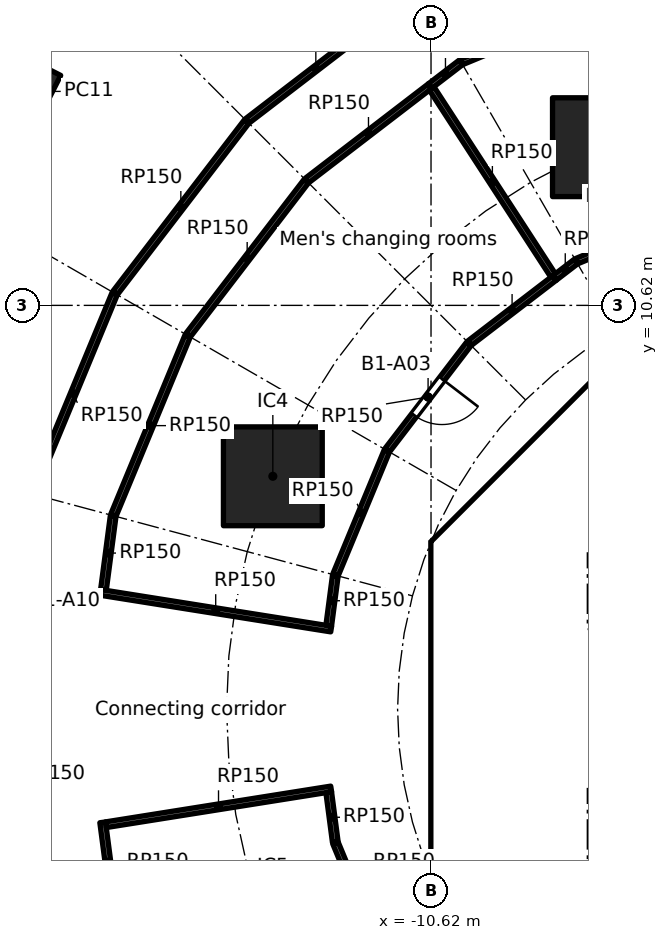
"""IFC4 building model, lengths in metres.
Left out: names, types, materials, properties, quantities, classifications, styles, units other than length and angle.
Written with IfcOpenShell. Run it as: python <this file> out.ifc"""

import sys

from ifc_helpers import new_model, si_unit, direction, frame, frame_2d, origin, origin_2d, place, context, subcontext, project, spatial, polyline, rectangle, hollow_rectangle, outline, extrude, element, fill, save


model = new_model("IFC4")
c1 = context("Model", 3, precision=1e-05, world=origin(), true_north=direction((0.0, 1.0)))
c2 = subcontext(c1, "Body", "Model", "MODEL_VIEW")
j1 = project(units=[si_unit("LENGTHUNIT", "METRE"), si_unit("PLANEANGLEUNIT", "RADIAN")], contexts=[c1])
p1 = place(None, origin())
s1 = spatial("IfcSite", under=j1, at=p1, CompositionType="ELEMENT")
p2 = place(p1, origin())
s2 = spatial("IfcBuilding", under=s1, at=p2, CompositionType="ELEMENT")
p3 = place(p2, frame((0.0, 0.0, -5.0)))
s3 = spatial("IfcBuildingStorey", under=s2, at=p3, CompositionType="ELEMENT", Elevation=-5.0)
p4 = place(p3, frame((-21.082, 16.25, 0.0), z_axis=(0.0, 0.0, 1.0), x_axis=(-0.452462697578, -0.891783329795, 0.0)))
e1 = element("IfcColumn", 1, at=p4, inside=s3, PredefinedType="COLUMN", context=c2, shape_type="SweptSolid", body=[
    extrude(hollow_rectangle(XDim=1.4, YDim=0.9, WallThickness=0.05, at=origin_2d()), origin(), (0.0, 0.0, 1.0), 5.0),
])
for number, where, z_axis, x_axis in (
    (2, (-6.123, 14.782, 0.0), (0.0, 0.0, 1.0), (1.0, 0.0, 0.0)),
    (3, (-14.782, 6.123, 0.0), (0.0, 0.0, 1.0), (1.0, 0.0, 0.0)),
):
    element("IfcColumn", number, at=place(p3, frame(where, z_axis=z_axis, x_axis=x_axis)), inside=s3, PredefinedType="COLUMN", context=c2, shape_type="SweptSolid", body=[
        extrude(rectangle(XDim=2.6, YDim=2.6, at=origin_2d()), origin(), (0.0, 0.0, 1.0), 5.0),
    ])
p5 = place(p3, frame((-4.613, 9.988, 0.0), z_axis=(0.0, 0.0, 1.0), x_axis=(-0.707106781187, -0.707106781187, 0.0)))
e4 = element("IfcWall", 4, at=p5, inside=s3, PredefinedType="SHEAR", context=c2, shape_type="SweptSolid", body=[
    extrude(rectangle(XDim=7.602, YDim=0.6, at=frame_2d((3.801, 0.0))), origin(), (0.0, 0.0, 1.0), 4.6),
])
p6 = place(p5, frame((0.351, 0.0, 0.0)))
e5 = element("IfcOpeningElement", 5, at=p6, cuts=e4, PredefinedType="OPENING", context=c2, shape_type="SweptSolid", body=[
    extrude(rectangle(XDim=1.1, YDim=2.1, at=frame_2d((0.55, 1.05))), frame((0.0, 0.31, 0.0), z_axis=(0.0, -1.0, 0.0), x_axis=(1.0, 0.0, 0.0)), (0.0, 0.0, 1.0), 0.62),
])
p7 = place(p3, frame((-10.325, 3.801, 0.0), z_axis=(0.0, 0.0, 1.0), x_axis=(0.0, -1.0, 0.0)))
e6 = element("IfcWall", 6, at=p7, inside=s3, PredefinedType="SHEAR", context=c2, shape_type="SweptSolid", body=[
    extrude(rectangle(XDim=7.602, YDim=0.6, at=frame_2d((3.801, 0.0))), origin(), (0.0, 0.0, 1.0), 4.6),
])
p8 = place(p7, frame((0.651, 0.0, 0.0)))
e7 = element("IfcOpeningElement", 7, at=p8, cuts=e6, PredefinedType="OPENING", context=c2, shape_type="SweptSolid", body=[
    extrude(rectangle(XDim=1.5, YDim=2.1, at=frame_2d((0.75, 1.05))), frame((0.0, 0.31, 0.0), z_axis=(0.0, -1.0, 0.0), x_axis=(1.0, 0.0, 0.0)), (0.0, 0.0, 1.0), 0.62),
])
p9 = place(p7, frame((5.451, 0.0, 0.0)))
e8 = element("IfcOpeningElement", 8, at=p9, cuts=e6, PredefinedType="OPENING", context=c2, shape_type="SweptSolid", body=[
    extrude(rectangle(XDim=1.5, YDim=2.1, at=frame_2d((0.75, 1.05))), frame((0.0, 0.31, 0.0), z_axis=(0.0, -1.0, 0.0), x_axis=(1.0, 0.0, 0.0)), (0.0, 0.0, 1.0), 0.62),
])
p10 = place(p3, frame((-6.7, 2.0, 0.0), z_axis=(0.0, 0.0, 1.0), x_axis=(1.0, 0.0, 0.0)))
e9 = element("IfcWall", 9, at=p10, inside=s3, PredefinedType="SOLIDWALL", context=c2, shape_type="SweptSolid", body=[
    extrude(rectangle(XDim=13.4, YDim=0.2, at=frame_2d((6.7, 0.0))), origin(), (0.0, 0.0, 1.0), 4.6),
])
p11 = place(p10, frame((0.65, 0.0, 0.0)))
e10 = element("IfcOpeningElement", 10, at=p11, cuts=e9, PredefinedType="OPENING", context=c2, shape_type="SweptSolid", body=[
    extrude(rectangle(XDim=1.1, YDim=2.1, at=frame_2d((0.55, 1.05))), frame((0.0, 0.11, 0.0), z_axis=(0.0, -1.0, 0.0), x_axis=(1.0, 0.0, 0.0)), (0.0, 0.0, 1.0), 0.22),
])
p12 = place(p10, frame((2.85, 0.0, 0.0)))
e11 = element("IfcOpeningElement", 11, at=p12, cuts=e9, PredefinedType="OPENING", context=c2, shape_type="SweptSolid", body=[
    extrude(rectangle(XDim=1.1, YDim=2.1, at=frame_2d((0.55, 1.05))), frame((0.0, 0.11, 0.0), z_axis=(0.0, -1.0, 0.0), x_axis=(1.0, 0.0, 0.0)), (0.0, 0.0, 1.0), 0.22),
])
p13 = place(p10, frame((5.05, 0.0, 0.0)))
e12 = element("IfcOpeningElement", 12, at=p13, cuts=e9, PredefinedType="OPENING", context=c2, shape_type="SweptSolid", body=[
    extrude(rectangle(XDim=1.1, YDim=2.1, at=frame_2d((0.55, 1.05))), frame((0.0, 0.11, 0.0), z_axis=(0.0, -1.0, 0.0), x_axis=(1.0, 0.0, 0.0)), (0.0, 0.0, 1.0), 0.22),
])
p14 = place(p10, frame((7.25, 0.0, 0.0)))
e13 = element("IfcOpeningElement", 13, at=p14, cuts=e9, PredefinedType="OPENING", context=c2, shape_type="SweptSolid", body=[
    extrude(rectangle(XDim=1.1, YDim=2.1, at=frame_2d((0.55, 1.05))), frame((0.0, 0.11, 0.0), z_axis=(0.0, -1.0, 0.0), x_axis=(1.0, 0.0, 0.0)), (0.0, 0.0, 1.0), 0.22),
])
p15 = place(p10, frame((9.45, 0.0, 0.0)))
e14 = element("IfcOpeningElement", 14, at=p15, cuts=e9, PredefinedType="OPENING", context=c2, shape_type="SweptSolid", body=[
    extrude(rectangle(XDim=1.1, YDim=2.1, at=frame_2d((0.55, 1.05))), frame((0.0, 0.11, 0.0), z_axis=(0.0, -1.0, 0.0), x_axis=(1.0, 0.0, 0.0)), (0.0, 0.0, 1.0), 0.22),
])
p16 = place(p10, frame((11.65, 0.0, 0.0)))
e15 = element("IfcOpeningElement", 15, at=p16, cuts=e9, PredefinedType="OPENING", context=c2, shape_type="SweptSolid", body=[
    extrude(rectangle(XDim=1.1, YDim=2.1, at=frame_2d((0.55, 1.05))), frame((0.0, 0.11, 0.0), z_axis=(0.0, -1.0, 0.0), x_axis=(1.0, 0.0, 0.0)), (0.0, 0.0, 1.0), 0.22),
])
p17 = place(p3, frame((-6.7, -2.0, 0.0), z_axis=(0.0, 0.0, 1.0), x_axis=(1.0, 0.0, 0.0)))
e16 = element("IfcWall", 16, at=p17, inside=s3, PredefinedType="SOLIDWALL", context=c2, shape_type="SweptSolid", body=[
    extrude(rectangle(XDim=13.4, YDim=0.2, at=frame_2d((6.7, 0.0))), origin(), (0.0, 0.0, 1.0), 4.6),
])
p18 = place(p17, frame((0.65, 0.0, 0.0)))
e17 = element("IfcOpeningElement", 17, at=p18, cuts=e16, PredefinedType="OPENING", context=c2, shape_type="SweptSolid", body=[
    extrude(rectangle(XDim=1.1, YDim=2.1, at=frame_2d((0.55, 1.05))), frame((0.0, 0.11, 0.0), z_axis=(0.0, -1.0, 0.0), x_axis=(1.0, 0.0, 0.0)), (0.0, 0.0, 1.0), 0.22),
])
p19 = place(p17, frame((2.85, 0.0, 0.0)))
e18 = element("IfcOpeningElement", 18, at=p19, cuts=e16, PredefinedType="OPENING", context=c2, shape_type="SweptSolid", body=[
    extrude(rectangle(XDim=1.1, YDim=2.1, at=frame_2d((0.55, 1.05))), frame((0.0, 0.11, 0.0), z_axis=(0.0, -1.0, 0.0), x_axis=(1.0, 0.0, 0.0)), (0.0, 0.0, 1.0), 0.22),
])
p20 = place(p17, frame((5.05, 0.0, 0.0)))
e19 = element("IfcOpeningElement", 19, at=p20, cuts=e16, PredefinedType="OPENING", context=c2, shape_type="SweptSolid", body=[
    extrude(rectangle(XDim=1.1, YDim=2.1, at=frame_2d((0.55, 1.05))), frame((0.0, 0.11, 0.0), z_axis=(0.0, -1.0, 0.0), x_axis=(1.0, 0.0, 0.0)), (0.0, 0.0, 1.0), 0.22),
])
p21 = place(p17, frame((7.25, 0.0, 0.0)))
e20 = element("IfcOpeningElement", 20, at=p21, cuts=e16, PredefinedType="OPENING", context=c2, shape_type="SweptSolid", body=[
    extrude(rectangle(XDim=1.1, YDim=2.1, at=frame_2d((0.55, 1.05))), frame((0.0, 0.11, 0.0), z_axis=(0.0, -1.0, 0.0), x_axis=(1.0, 0.0, 0.0)), (0.0, 0.0, 1.0), 0.22),
])
p22 = place(p17, frame((9.45, 0.0, 0.0)))
e21 = element("IfcOpeningElement", 21, at=p22, cuts=e16, PredefinedType="OPENING", context=c2, shape_type="SweptSolid", body=[
    extrude(rectangle(XDim=1.1, YDim=2.1, at=frame_2d((0.55, 1.05))), frame((0.0, 0.11, 0.0), z_axis=(0.0, -1.0, 0.0), x_axis=(1.0, 0.0, 0.0)), (0.0, 0.0, 1.0), 0.22),
])
p23 = place(p17, frame((11.65, 0.0, 0.0)))
e22 = element("IfcOpeningElement", 22, at=p23, cuts=e16, PredefinedType="OPENING", context=c2, shape_type="SweptSolid", body=[
    extrude(rectangle(XDim=1.1, YDim=2.1, at=frame_2d((0.55, 1.05))), frame((0.0, 0.11, 0.0), z_axis=(0.0, -1.0, 0.0), x_axis=(1.0, 0.0, 0.0)), (0.0, 0.0, 1.0), 0.22),
])
p24 = place(p3, origin())
e23 = element("IfcWall", 23, at=p24, inside=s3, PredefinedType="SHEAR", context=c2, shape_type="SweptSolid", body=[
    extrude(outline(polyline([(-10.625, -3.801), (-10.025, -3.801), (-10.025, -4.152), (-9.776, -4.401), (-10.2, -4.825), (-10.625, -4.401), (-10.625, -3.801)])), origin(), (0.0, 0.0, 1.0), 4.6),
])
p25 = place(p3, origin())
e24 = element("IfcWall", 24, at=p25, inside=s3, PredefinedType="SHEAR", context=c2, shape_type="SweptSolid", body=[
    extrude(outline(polyline([(-10.2, 4.825), (-9.776, 4.401), (-10.025, 4.152), (-10.025, 3.801), (-10.625, 3.801), (-10.625, 4.401), (-10.2, 4.825)])), origin(), (0.0, 0.0, 1.0), 4.6),
])
p26 = place(p3, origin())
e25 = element("IfcWall", 25, at=p26, inside=s3, PredefinedType="SOLIDWALL", context=c2, shape_type="SweptSolid", body=[
    extrude(outline(polyline([(-6.7, -2.1), (-6.5, -2.1), (-6.5, -4.1), (-4.5, -4.1), (-4.5, -2.1), (-4.3, -2.1), (-4.3, -4.1), (-2.3, -4.1), (-2.3, -2.1), (-2.1, -2.1), (-2.1, -4.1), (-0.1, -4.1), (-0.1, -2.1), (0.1, -2.1), (0.1, -4.1), (2.1, -4.1), (2.1, -2.1), (2.3, -2.1), (2.3, -4.1), (4.3, -4.1), (4.3, -2.1), (4.5, -2.1), (4.5, -4.1), (6.5, -4.1), (6.5, -2.1), (6.7, -2.1), (6.7, -4.3), (-6.7, -4.3), (-6.7, -2.1)])), origin(), (0.0, 0.0, 1.0), 4.6),
])
p27 = place(p3, origin())
e26 = element("IfcWall", 26, at=p27, inside=s3, PredefinedType="SOLIDWALL", context=c2, shape_type="SweptSolid", body=[
    extrude(outline(polyline([(-6.5, 2.1), (-6.7, 2.1), (-6.7, 4.3), (6.7, 4.3), (6.7, 2.1), (6.5, 2.1), (6.5, 4.1), (4.5, 4.1), (4.5, 2.1), (4.3, 2.1), (4.3, 4.1), (2.3, 4.1), (2.3, 2.1), (2.1, 2.1), (2.1, 4.1), (0.1, 4.1), (0.1, 2.1), (-0.1, 2.1), (-0.1, 4.1), (-2.1, 4.1), (-2.1, 2.1), (-2.3, 2.1), (-2.3, 4.1), (-4.3, 4.1), (-4.3, 2.1), (-4.5, 2.1), (-4.5, 4.1), (-6.5, 4.1), (-6.5, 2.1)])), origin(), (0.0, 0.0, 1.0), 4.6),
])
for number, where, z_axis, x_axis in (
    (27, (-10.025, -4.0, 0.0), (0.0, 0.0, 1.0), (1.0, 0.0, 0.0)),
    (28, (-10.025, 4.0, 0.0), (0.0, 0.0, 1.0), (1.0, 0.0, 0.0)),
):
    element("IfcWall", number, at=place(p3, frame(where, z_axis=z_axis, x_axis=x_axis)), inside=s3, PredefinedType="PARTITIONING", context=c2, shape_type="SweptSolid", body=[
        extrude(rectangle(XDim=3.325, YDim=0.2, at=frame_2d((1.662, 0.0))), origin(), (0.0, 0.0, 1.0), 4.6),
    ])
p28 = place(p3, frame((-21.121, 5.672, 0.0), z_axis=(0.0, 0.0, 1.0), x_axis=(0.38269058712, 0.923876568882, 0.0)))
e29 = element("IfcWall", 29, at=p28, inside=s3, PredefinedType="PARTITIONING", context=c2, shape_type="SweptSolid", body=[
    extrude(rectangle(XDim=5.686, YDim=0.15, at=frame_2d((2.843, 0.0))), origin(), (0.0, 0.0, 1.0), 4.6),
])
p29 = place(p3, frame((-19.259, -2.982, 0.0), z_axis=(0.0, 0.0, 1.0), x_axis=(0.130625106848, -0.991431833996, 0.0)))
e30 = element("IfcWall", 30, at=p29, inside=s3, PredefinedType="PARTITIONING", context=c2, shape_type="SweptSolid", body=[
    extrude(rectangle(XDim=2.11, YDim=0.15, at=frame_2d((1.055, 0.0))), origin(), (0.0, 0.0, 1.0), 4.6),
])
p30 = place(p3, frame((-19.323, 3.069, 0.0), z_axis=(0.0, 0.0, 1.0), x_axis=(0.987626164326, -0.156826526897, 0.0)))
e31 = element("IfcWall", 31, at=p30, inside=s3, PredefinedType="PARTITIONING", context=c2, shape_type="SweptSolid", body=[
    extrude(rectangle(XDim=6.152, YDim=0.15, at=frame_2d((3.076, 0.0))), origin(), (0.0, 0.0, 1.0), 4.6),
])
p31 = place(p3, frame((-18.984, 5.074, 0.0), z_axis=(0.0, 0.0, 1.0), x_axis=(-0.130547959689, -0.991441995389, 0.0)))
e32 = element("IfcWall", 32, at=p31, inside=s3, PredefinedType="PARTITIONING", context=c2, shape_type="SweptSolid", body=[
    extrude(rectangle(XDim=1.96, YDim=0.15, at=frame_2d((0.98, 0.0))), origin(), (0.0, 0.0, 1.0), 4.6),
])
p32 = place(p3, frame((-18.933, 10.945, 0.0), z_axis=(0.0, 0.0, 1.0), x_axis=(0.608757822828, 0.793356107398, 0.0)))
e33 = element("IfcWall", 33, at=p32, inside=s3, PredefinedType="PARTITIONING", context=c2, shape_type="SweptSolid", body=[
    extrude(rectangle(XDim=5.686, YDim=0.15, at=frame_2d((2.843, 0.0))), origin(), (0.0, 0.0, 1.0), 4.6),
])
p33 = place(p3, frame((-17.023, 9.815, 0.0), z_axis=(0.0, 0.0, 1.0), x_axis=(-0.382672704618, -0.923883976017, 0.0)))
e34 = element("IfcWall", 34, at=p33, inside=s3, PredefinedType="PARTITIONING", context=c2, shape_type="SweptSolid", body=[
    extrude(rectangle(XDim=5.106, YDim=0.15, at=frame_2d((2.553, 0.0))), origin(), (0.0, 0.0, 1.0), 4.6),
])
p34 = place(p3, frame((-15.456, 15.472, 0.0), z_axis=(0.0, 0.0, 1.0), x_axis=(0.793357543816, 0.608755950829, 0.0)))
e35 = element("IfcWall", 35, at=p34, inside=s3, PredefinedType="PARTITIONING", context=c2, shape_type="SweptSolid", body=[
    extrude(rectangle(XDim=4.55, YDim=0.15, at=frame_2d((2.275, 0.0))), origin(), (0.0, 0.0, 1.0), 4.6),
])
p35 = place(p3, frame((-13.903, 13.886, 0.0), z_axis=(0.0, 0.0, 1.0), x_axis=(-0.608760705644, -0.793353895348, 0.0)))
e36 = element("IfcWall", 36, at=p35, inside=s3, PredefinedType="PARTITIONING", context=c2, shape_type="SweptSolid", body=[
    extrude(rectangle(XDim=5.106, YDim=0.15, at=frame_2d((2.553, 0.0))), origin(), (0.0, 0.0, 1.0), 4.6),
])
p36 = place(p3, frame((-13.247, -2.104, 0.0), z_axis=(0.0, 0.0, 1.0), x_axis=(-0.98762373009, -0.156841855905, 0.0)))
e37 = element("IfcWall", 37, at=p36, inside=s3, PredefinedType="PARTITIONING", context=c2, shape_type="SweptSolid", body=[
    extrude(rectangle(XDim=6.002, YDim=0.15, at=frame_2d((3.001, 0.0))), origin(), (0.0, 0.0, 1.0), 4.6),
])
for number, where, z_axis, x_axis in (
    (38, (-13.312, 2.19, 0.0), (0.0, 0.0, 1.0), (0.131, 0.991, 0.0)),
    (39, (-13.138, -3.508, 0.0), (0.0, 0.0, 1.0), (-0.131, 0.991, 0.0)),
):
    element("IfcWall", number, at=place(p3, frame(where, z_axis=z_axis, x_axis=x_axis)), inside=s3, PredefinedType="PARTITIONING", context=c2, shape_type="SweptSolid", body=[
        extrude(rectangle(XDim=1.33, YDim=0.15, at=frame_2d((0.665, 0.0))), origin(), (0.0, 0.0, 1.0), 4.6),
    ])
p37 = place(p3, frame((-13.132, 3.531, 0.0), z_axis=(0.0, 0.0, 1.0), x_axis=(0.382677866108, 0.923881838111, 0.0)))
e40 = element("IfcWall", 40, at=p37, inside=s3, PredefinedType="PARTITIONING", context=c2, shape_type="SweptSolid", body=[
    extrude(rectangle(XDim=3.527, YDim=0.15, at=frame_2d((1.763, 0.0))), origin(), (0.0, 0.0, 1.0), 4.6),
])
p38 = place(p3, frame((-11.782, -6.789, 0.0), z_axis=(0.0, 0.0, 1.0), x_axis=(-0.382677866108, 0.923881838111, 0.0)))
e41 = element("IfcWall", 41, at=p38, inside=s3, PredefinedType="PARTITIONING", context=c2, shape_type="SweptSolid", body=[
    extrude(rectangle(XDim=3.527, YDim=0.15, at=frame_2d((1.763, 0.0))), origin(), (0.0, 0.0, 1.0), 4.6),
])
p39 = place(p38, frame((0.346, 0.0, 0.0)))
e42 = element("IfcOpeningElement", 42, at=p39, cuts=e41, PredefinedType="OPENING", context=c2, shape_type="SweptSolid", body=[
    extrude(rectangle(XDim=0.9, YDim=2.1, at=frame_2d((0.45, 1.05))), frame((0.0, 0.085, 0.0), z_axis=(0.0, -1.0, 0.0), x_axis=(1.0, 0.0, 0.0)), (0.0, 0.0, 1.0), 0.17),
])
p40 = place(p3, frame((-11.771, 6.809, 0.0), z_axis=(0.0, 0.0, 1.0), x_axis=(0.608736710054, 0.793372307201, 0.0)))
e43 = element("IfcWall", 43, at=p40, inside=s3, PredefinedType="PARTITIONING", context=c2, shape_type="SweptSolid", body=[
    extrude(rectangle(XDim=3.527, YDim=0.15, at=frame_2d((1.763, 0.0))), origin(), (0.0, 0.0, 1.0), 4.6),
])
p41 = place(p40, frame((1.163, 0.0, 0.0)))
e44 = element("IfcOpeningElement", 44, at=p41, cuts=e43, PredefinedType="OPENING", context=c2, shape_type="SweptSolid", body=[
    extrude(rectangle(XDim=1.2, YDim=2.1, at=frame_2d((0.6, 1.05))), frame((0.0, 0.085, 0.0), z_axis=(0.0, -1.0, 0.0), x_axis=(1.0, 0.0, 0.0)), (0.0, 0.0, 1.0), 0.17),
])
p42 = place(p3, frame((-10.644, 16.391, 0.0), z_axis=(0.0, 0.0, 1.0), x_axis=(-0.793356294792, -0.608757578609, 0.0)))
e45 = element("IfcWall", 45, at=p42, inside=s3, PredefinedType="PARTITIONING", context=c2, shape_type="SweptSolid", body=[
    extrude(rectangle(XDim=4.087, YDim=0.15, at=frame_2d((2.043, 0.0))), origin(), (0.0, 0.0, 1.0), 4.6),
])
p43 = place(p3, frame((-9.835, 17.012, 0.0), z_axis=(0.0, 0.0, 1.0), x_axis=(-0.793344280216, -0.608773236147, 0.0)))
e46 = element("IfcWall", 46, at=p43, inside=s3, PredefinedType="PARTITIONING", context=c2, shape_type="SweptSolid", body=[
    extrude(rectangle(XDim=1.02, YDim=0.15, at=frame_2d((0.51, 0.0))), origin(), (0.0, 0.0, 1.0), 4.6),
])
p44 = place(p3, frame((-9.607, 9.624, 0.0), z_axis=(0.0, 0.0, 1.0), x_axis=(0.793375345407, 0.608732750311, 0.0)))
e47 = element("IfcWall", 47, at=p44, inside=s3, PredefinedType="PARTITIONING", context=c2, shape_type="SweptSolid", body=[
    extrude(rectangle(XDim=2.824, YDim=0.15, at=frame_2d((1.412, 0.0))), origin(), (0.0, 0.0, 1.0), 4.6),
])
p45 = place(p3, frame((-7.407, 11.406, 0.0), z_axis=(0.0, 0.0, 1.0), x_axis=(-0.544646109016, 0.838665973993, 0.0)))
e48 = element("IfcWall", 48, at=p45, inside=s3, PredefinedType="PARTITIONING", context=c2, shape_type="SweptSolid", body=[
    extrude(rectangle(XDim=5.868, YDim=0.15, at=frame_2d((2.934, 0.0))), origin(), (0.0, 0.0, 1.0), 4.6),
])
p46 = place(p3, frame((-7.366, 11.343, 0.0), z_axis=(0.0, 0.0, 1.0), x_axis=(0.793360087844, 0.608752635326, 0.0)))
e49 = element("IfcWall", 49, at=p46, inside=s3, PredefinedType="PARTITIONING", context=c2, shape_type="SweptSolid", body=[
    extrude(rectangle(XDim=0.702, YDim=0.15, at=frame_2d((0.351, 0.0))), origin(), (0.0, 0.0, 1.0), 4.6),
])
p47 = place(p3, frame((-6.789, 11.782, 0.0), z_axis=(0.0, 0.0, 1.0), x_axis=(0.923881838111, 0.382677866108, 0.0)))
e50 = element("IfcWall", 50, at=p47, inside=s3, PredefinedType="PARTITIONING", context=c2, shape_type="SweptSolid", body=[
    extrude(rectangle(XDim=3.527, YDim=0.15, at=frame_2d((1.763, 0.0))), origin(), (0.0, 0.0, 1.0), 4.6),
])
p48 = place(p3, frame((-5.097, 18.978, 0.0), z_axis=(0.0, 0.0, 1.0), x_axis=(-0.923883976017, -0.382672704618, 0.0)))
e51 = element("IfcWall", 51, at=p48, inside=s3, PredefinedType="PARTITIONING", context=c2, shape_type="SweptSolid", body=[
    extrude(rectangle(XDim=5.106, YDim=0.15, at=frame_2d((2.553, 0.0))), origin(), (0.0, 0.0, 1.0), 4.6),
])
p49 = place(p8, origin())
e52 = element("IfcDoor", 52, at=p49, inside=s3, OperationType="DOUBLE_DOOR_SINGLE_SWING", PredefinedType="DOOR", context=c2, shape_type="SweptSolid", body=[
    extrude(rectangle(XDim=1.5, YDim=2.1, at=frame_2d((0.75, 1.05))), frame((0.0, 0.025, 0.0), z_axis=(0.0, -1.0, 0.0), x_axis=(1.0, 0.0, 0.0)), (0.0, 0.0, 1.0), 0.05),
])
fill(e7, e52)
p50 = place(p9, origin())
e53 = element("IfcDoor", 53, at=p50, inside=s3, OperationType="DOUBLE_DOOR_SINGLE_SWING", PredefinedType="DOOR", context=c2, shape_type="SweptSolid", body=[
    extrude(rectangle(XDim=1.5, YDim=2.1, at=frame_2d((0.75, 1.05))), frame((0.0, 0.025, 0.0), z_axis=(0.0, -1.0, 0.0), x_axis=(1.0, 0.0, 0.0)), (0.0, 0.0, 1.0), 0.05),
])
fill(e8, e53)
p51 = place(p41, frame((1.2, 0.0, 0.0), x_axis=(-1.0, 0.0, 0.0)))
e54 = element("IfcDoor", 54, at=p51, inside=s3, OperationType="SINGLE_SWING_LEFT", PredefinedType="DOOR", context=c2, shape_type="SweptSolid", body=[
    extrude(rectangle(XDim=1.2, YDim=2.1, at=frame_2d((0.6, 1.05))), frame((0.0, 0.025, 0.0), z_axis=(0.0, -1.0, 0.0), x_axis=(1.0, 0.0, 0.0)), (0.0, 0.0, 1.0), 0.05),
])
fill(e44, e54)
save(model, sys.argv[1])
